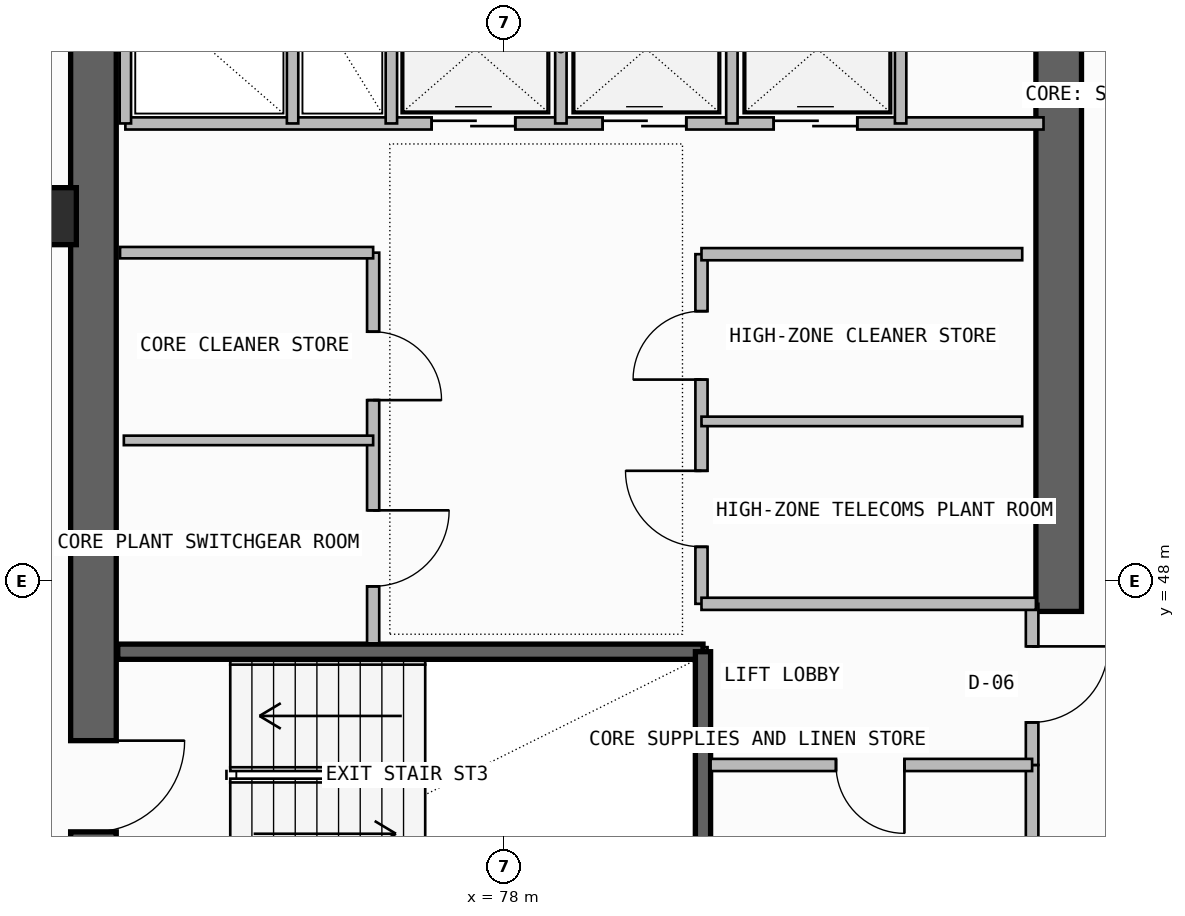
"""IFC4 building model, lengths in metres.
Left out: names, types, materials, properties, quantities, classifications, styles, units other than length and angle.
Written with IfcOpenShell. Run it as: python <this file> out.ifc"""

import sys

from ifc_helpers import new_model, si_unit, direction, frame, frame_2d, origin, origin_2d, place, context, subcontext, project, spatial, rectangle, extrude, element, fill, save


model = new_model("IFC4")
c1 = context("Model", 3, precision=1e-05, world=origin(), true_north=direction((0.0, 1.0)))
c2 = subcontext(c1, "Body", "Model", "MODEL_VIEW")
j1 = project(units=[si_unit("LENGTHUNIT", "METRE"), si_unit("PLANEANGLEUNIT", "RADIAN")], contexts=[c1])
p1 = place(None, origin())
s1 = spatial("IfcSite", under=j1, at=p1, CompositionType="ELEMENT")
p2 = place(p1, origin())
s2 = spatial("IfcBuilding", under=s1, at=p2, CompositionType="ELEMENT")
p3 = place(p2, frame((0.0, 0.0, 264.26)))
s3 = spatial("IfcBuildingStorey", under=s2, at=p3, CompositionType="ELEMENT", Elevation=264.26)
p4 = place(p3, frame((72.6, 43.35, -0.26), z_axis=(0.0, 0.0, 1.0), x_axis=(0.0, 1.0, 0.0)))
e1 = element("IfcWall", 1, at=p4, inside=s3, PredefinedType="SHEAR", context=c2, shape_type="SweptSolid", body=[
    extrude(rectangle(XDim=12.7, YDim=0.6, at=frame_2d((6.35, 0.0))), origin(), (0.0, 0.0, 1.0), 3.52),
])
p5 = place(p4, frame((1.35, 0.0, 0.26)))
e2 = element("IfcOpeningElement", 2, at=p5, cuts=e1, PredefinedType="OPENING", context=c2, shape_type="SweptSolid", body=[
    extrude(rectangle(XDim=1.2, YDim=2.2, at=frame_2d((0.6, 1.1))), frame((0.0, 0.31, 0.0), z_axis=(0.0, -1.0, 0.0), x_axis=(1.0, 0.0, 0.0)), (0.0, 0.0, 1.0), 0.62),
])
p6 = place(p3, frame((85.3, 47.6, -0.26), z_axis=(0.0, 0.0, 1.0), x_axis=(0.0, 1.0, 0.0)))
e3 = element("IfcWall", 3, at=p6, inside=s3, PredefinedType="SHEAR", context=c2, shape_type="SweptSolid", body=[
    extrude(rectangle(XDim=8.45, YDim=0.6, at=frame_2d((4.225, 0.0))), origin(), (0.0, 0.0, 1.0), 3.52),
])
p7 = place(p3, frame((72.0, 52.8, 0.0), z_axis=(0.0, 0.0, 1.0), x_axis=(1.0, 0.0, 0.0)))
e4 = element("IfcColumn", 4, at=p7, inside=s3, PredefinedType="COLUMN", context=c2, shape_type="SweptSolid", body=[
    extrude(rectangle(XDim=0.75, YDim=0.75, at=origin_2d()), origin(), (0.0, 0.0, 1.0), 3.52),
])
p8 = place(p3, frame((72.92, 47.07, -0.26), z_axis=(0.0, 0.0, 1.0), x_axis=(1.0, 0.0, 0.0)))
e5 = element("IfcWall", 5, at=p8, inside=s3, PredefinedType="SOLIDWALL", context=c2, shape_type="SweptSolid", body=[
    extrude(rectangle(XDim=7.7, YDim=0.2, at=frame_2d((3.85, 0.0))), origin(), (0.0, 0.0, 1.0), 3.52),
])
p9 = place(p3, frame((80.62, 43.83, -0.26), z_axis=(0.0, 0.0, 1.0), x_axis=(0.0, 1.0, 0.0)))
e6 = element("IfcWall", 6, at=p9, inside=s3, PredefinedType="SOLIDWALL", context=c2, shape_type="SweptSolid", body=[
    extrude(rectangle(XDim=3.24, YDim=0.2, at=frame_2d((1.62, 0.0))), origin(), (0.0, 0.0, 1.0), 3.52),
])
p10 = place(p3, frame((84.95, 43.68, 0.0), z_axis=(0.0, 0.0, 1.0), x_axis=(0.0, 1.0, 0.0)))
e7 = element("IfcWall", 7, at=p10, inside=s3, PredefinedType="PLUMBINGWALL", context=c2, shape_type="SweptSolid", body=[
    extrude(rectangle(XDim=1.9, YDim=0.165, at=frame_2d((0.95, 0.0))), origin(), (0.0, 0.0, 1.0), 3.26),
])
p11 = place(p3, frame((84.95, 45.58, 0.0), z_axis=(0.0, 0.0, 1.0), x_axis=(0.0, 1.0, 0.0)))
e8 = element("IfcWall", 8, at=p11, inside=s3, PredefinedType="PARTITIONING", context=c2, shape_type="SweptSolid", body=[
    extrude(rectangle(XDim=2.12, YDim=0.165, at=frame_2d((1.06, 0.0))), origin(), (0.0, 0.0, 1.0), 3.26),
])
p12 = place(p11, frame((0.56, 0.0, 0.0)))
e9 = element("IfcOpeningElement", 9, at=p12, cuts=e8, PredefinedType="OPENING", context=c2, shape_type="SweptSolid", body=[
    extrude(rectangle(XDim=1.0, YDim=2.2, at=frame_2d((0.5, 1.1))), frame((0.0, 0.093, 0.0), z_axis=(0.0, -1.0, 0.0), x_axis=(1.0, 0.0, 0.0)), (0.0, 0.0, 1.0), 0.185),
])
p13 = place(p3, frame((80.72, 45.58, 0.0), z_axis=(0.0, 0.0, 1.0), x_axis=(1.0, 0.0, 0.0)))
e10 = element("IfcWall", 10, at=p13, inside=s3, PredefinedType="PLUMBINGWALL", context=c2, shape_type="SweptSolid", body=[
    extrude(rectangle(XDim=4.23, YDim=0.16, at=frame_2d((2.115, 0.0))), origin(), (0.0, 0.0, 1.0), 3.26),
])
p14 = place(p13, frame((1.65, 0.0, 0.0)))
e11 = element("IfcOpeningElement", 11, at=p14, cuts=e10, PredefinedType="OPENING", context=c2, shape_type="SweptSolid", body=[
    extrude(rectangle(XDim=0.9, YDim=2.1, at=frame_2d((0.45, 1.05))), frame((0.0, 0.09, 0.0), z_axis=(0.0, -1.0, 0.0), x_axis=(1.0, 0.0, 0.0)), (0.0, 0.0, 1.0), 0.18),
])
p15 = place(p3, frame((76.28, 47.18, 0.0), z_axis=(0.0, 0.0, 1.0), x_axis=(0.0, 1.0, 0.0)))
e12 = element("IfcWall", 12, at=p15, inside=s3, PredefinedType="SOLIDWALL", context=c2, shape_type="SweptSolid", body=[
    extrude(rectangle(XDim=5.14, YDim=0.16, at=frame_2d((2.57, 0.0))), origin(), (0.0, 0.0, 1.0), 3.26),
])
p16 = place(p15, frame((0.75, 0.0, 0.0)))
e13 = element("IfcOpeningElement", 13, at=p16, cuts=e12, PredefinedType="OPENING", context=c2, shape_type="SweptSolid", body=[
    extrude(rectangle(XDim=1.0, YDim=2.2, at=frame_2d((0.5, 1.1))), frame((0.0, 0.09, 0.0), z_axis=(0.0, -1.0, 0.0), x_axis=(1.0, 0.0, 0.0)), (0.0, 0.0, 1.0), 0.18),
])
p17 = place(p15, frame((3.2, 0.0, 0.0)))
e14 = element("IfcOpeningElement", 14, at=p17, cuts=e12, PredefinedType="OPENING", context=c2, shape_type="SweptSolid", body=[
    extrude(rectangle(XDim=0.9, YDim=2.1, at=frame_2d((0.45, 1.05))), frame((0.0, 0.09, 0.0), z_axis=(0.0, -1.0, 0.0), x_axis=(1.0, 0.0, 0.0)), (0.0, 0.0, 1.0), 0.18),
])
p18 = place(p3, frame((72.95, 52.32, 0.0), z_axis=(0.0, 0.0, 1.0), x_axis=(1.0, 0.0, 0.0)))
e15 = element("IfcWall", 15, at=p18, inside=s3, PredefinedType="SOLIDWALL", context=c2, shape_type="SweptSolid", body=[
    extrude(rectangle(XDim=3.33, YDim=0.15, at=frame_2d((1.665, 0.0))), origin(), (0.0, 0.0, 1.0), 3.26),
])
p19 = place(p3, frame((73.0, 49.85, 0.0), z_axis=(0.0, 0.0, 1.0), x_axis=(1.0, 0.0, 0.0)))
e16 = element("IfcWall", 16, at=p19, inside=s3, PredefinedType="PARTITIONING", context=c2, shape_type="SweptSolid", body=[
    extrude(rectangle(XDim=3.28, YDim=0.125, at=frame_2d((1.64, 0.0))), origin(), (0.0, 0.0, 1.0), 3.26),
])
p20 = place(p3, frame((80.6, 47.7, 0.0), z_axis=(0.0, 0.0, 1.0), x_axis=(0.0, 1.0, 0.0)))
e17 = element("IfcWall", 17, at=p20, inside=s3, PredefinedType="SOLIDWALL", context=c2, shape_type="SweptSolid", body=[
    extrude(rectangle(XDim=4.6, YDim=0.16, at=frame_2d((2.3, 0.0))), origin(), (0.0, 0.0, 1.0), 3.26),
])
p21 = place(p20, frame((0.75, 0.0, 0.0)))
e18 = element("IfcOpeningElement", 18, at=p21, cuts=e17, PredefinedType="OPENING", context=c2, shape_type="SweptSolid", body=[
    extrude(rectangle(XDim=1.0, YDim=2.2, at=frame_2d((0.5, 1.1))), frame((0.0, 0.09, 0.0), z_axis=(0.0, -1.0, 0.0), x_axis=(1.0, 0.0, 0.0)), (0.0, 0.0, 1.0), 0.18),
])
p22 = place(p20, frame((2.95, 0.0, 0.0)))
e19 = element("IfcOpeningElement", 19, at=p22, cuts=e17, PredefinedType="OPENING", context=c2, shape_type="SweptSolid", body=[
    extrude(rectangle(XDim=0.9, YDim=2.1, at=frame_2d((0.45, 1.05))), frame((0.0, 0.09, 0.0), z_axis=(0.0, -1.0, 0.0), x_axis=(1.0, 0.0, 0.0)), (0.0, 0.0, 1.0), 0.18),
])
p23 = place(p3, frame((80.6, 47.7, 0.0), z_axis=(0.0, 0.0, 1.0), x_axis=(1.0, 0.0, 0.0)))
e20 = element("IfcWall", 20, at=p23, inside=s3, PredefinedType="SOLIDWALL", context=c2, shape_type="SweptSolid", body=[
    extrude(rectangle(XDim=4.4, YDim=0.16, at=frame_2d((2.2, 0.0))), origin(), (0.0, 0.0, 1.0), 3.26),
])
p24 = place(p3, frame((80.6, 52.3, 0.0), z_axis=(0.0, 0.0, 1.0), x_axis=(1.0, 0.0, 0.0)))
e21 = element("IfcWall", 21, at=p24, inside=s3, PredefinedType="SOLIDWALL", context=c2, shape_type="SweptSolid", body=[
    extrude(rectangle(XDim=4.22, YDim=0.16, at=frame_2d((2.11, 0.0))), origin(), (0.0, 0.0, 1.0), 3.26),
])
p25 = place(p3, frame((80.6, 50.1, 0.0), z_axis=(0.0, 0.0, 1.0), x_axis=(1.0, 0.0, 0.0)))
e22 = element("IfcWall", 22, at=p25, inside=s3, PredefinedType="PARTITIONING", context=c2, shape_type="SweptSolid", body=[
    extrude(rectangle(XDim=4.22, YDim=0.125, at=frame_2d((2.11, 0.0))), origin(), (0.0, 0.0, 1.0), 3.26),
])
p26 = place(p3, frame((73.02, 54.02, 0.0), z_axis=(0.0, 0.0, 1.0), x_axis=(1.0, 0.0, 0.0)))
e23 = element("IfcWall", 23, at=p26, inside=s3, PredefinedType="SOLIDWALL", context=c2, shape_type="SweptSolid", body=[
    extrude(rectangle(XDim=12.08, YDim=0.16, at=frame_2d((6.04, 0.0))), origin(), (0.0, 0.0, 1.0), 3.26),
])
p27 = place(p26, frame((4.03, 0.0, 0.0)))
e24 = element("IfcOpeningElement", 24, at=p27, cuts=e23, PredefinedType="OPENING", context=c2, shape_type="SweptSolid", body=[
    extrude(rectangle(XDim=1.1, YDim=2.25, at=frame_2d((0.55, 1.125))), frame((0.0, 0.09, 0.0), z_axis=(0.0, -1.0, 0.0), x_axis=(1.0, 0.0, 0.0)), (0.0, 0.0, 1.0), 0.18),
])
p28 = place(p26, frame((6.28, 0.0, 0.0)))
e25 = element("IfcOpeningElement", 25, at=p28, cuts=e23, PredefinedType="OPENING", context=c2, shape_type="SweptSolid", body=[
    extrude(rectangle(XDim=1.1, YDim=2.25, at=frame_2d((0.55, 1.125))), frame((0.0, 0.09, 0.0), z_axis=(0.0, -1.0, 0.0), x_axis=(1.0, 0.0, 0.0)), (0.0, 0.0, 1.0), 0.18),
])
p29 = place(p26, frame((8.53, 0.0, 0.0)))
e26 = element("IfcOpeningElement", 26, at=p29, cuts=e23, PredefinedType="OPENING", context=c2, shape_type="SweptSolid", body=[
    extrude(rectangle(XDim=1.1, YDim=2.25, at=frame_2d((0.55, 1.125))), frame((0.0, 0.09, 0.0), z_axis=(0.0, -1.0, 0.0), x_axis=(1.0, 0.0, 0.0)), (0.0, 0.0, 1.0), 0.18),
])
p30 = place(p3, frame((73.02, 54.02, 0.0), z_axis=(0.0, 0.0, 1.0), x_axis=(0.0, 1.0, 0.0)))
e27 = element("IfcWall", 27, at=p30, inside=s3, PredefinedType="PLUMBINGWALL", context=c2, shape_type="SweptSolid", body=[
    extrude(rectangle(XDim=1.94, YDim=0.15, at=frame_2d((0.97, 0.0))), origin(), (0.0, 0.0, 1.0), 3.26),
])
p31 = place(p3, frame((76.52, 54.02, 0.0), z_axis=(0.0, 0.0, 1.0), x_axis=(0.0, 1.0, 0.0)))
e28 = element("IfcWall", 28, at=p31, inside=s3, PredefinedType="SOLIDWALL", context=c2, shape_type="SweptSolid", body=[
    extrude(rectangle(XDim=1.94, YDim=0.15, at=frame_2d((0.97, 0.0))), origin(), (0.0, 0.0, 1.0), 3.26),
])
p32 = place(p3, frame((75.22, 54.02, 0.0), z_axis=(0.0, 0.0, 1.0), x_axis=(0.0, 1.0, 0.0)))
e29 = element("IfcWall", 29, at=p32, inside=s3, PredefinedType="PLUMBINGWALL", context=c2, shape_type="SweptSolid", body=[
    extrude(rectangle(XDim=1.94, YDim=0.15, at=frame_2d((0.97, 0.0))), origin(), (0.0, 0.0, 1.0), 3.26),
])
for number, where, z_axis, x_axis in (
    (30, (78.75, 54.02, 0.0), (0.0, 0.0, 1.0), (0.0, 1.0, 0.0)),
    (31, (81.0, 54.02, 0.0), (0.0, 0.0, 1.0), (0.0, 1.0, 0.0)),
):
    element("IfcWall", number, at=place(p3, frame(where, z_axis=z_axis, x_axis=x_axis)), inside=s3, PredefinedType="PLUMBINGWALL", context=c2, shape_type="SweptSolid", body=[
        extrude(rectangle(XDim=1.96, YDim=0.15, at=frame_2d((0.98, 0.0))), origin(), (0.0, 0.0, 1.0), 3.26),
    ])
p33 = place(p3, frame((83.22, 54.02, 0.0), z_axis=(0.0, 0.0, 1.0), x_axis=(0.0, 1.0, 0.0)))
e32 = element("IfcWall", 32, at=p33, inside=s3, PredefinedType="SOLIDWALL", context=c2, shape_type="SweptSolid", body=[
    extrude(rectangle(XDim=1.96, YDim=0.15, at=frame_2d((0.98, 0.0))), origin(), (0.0, 0.0, 1.0), 3.26),
])
p34 = place(p5, frame((1.2, 0.0, 0.0), z_axis=(0.0, 0.0, 1.0), x_axis=(-1.0, 0.0, 0.0)))
e33 = element("IfcDoor", 33, at=p34, inside=s3, OperationType="SINGLE_SWING_LEFT", PredefinedType="USERDEFINED", context=c2, shape_type="SweptSolid", body=[
    extrude(rectangle(XDim=1.2, YDim=2.2, at=frame_2d((0.6, 1.1))), frame((0.0, 0.025, 0.0), z_axis=(0.0, -1.0, 0.0), x_axis=(1.0, 0.0, 0.0)), (0.0, 0.0, 1.0), 0.05),
])
fill(e2, e33)
p35 = place(p12, frame((1.0, 0.0, 0.0), z_axis=(0.0, 0.0, 1.0), x_axis=(-1.0, 0.0, 0.0)))
e34 = element("IfcDoor", 34, at=p35, inside=s3, OperationType="SINGLE_SWING_LEFT", PredefinedType="DOOR", context=c2, shape_type="SweptSolid", body=[
    extrude(rectangle(XDim=1.0, YDim=2.2, at=frame_2d((0.5, 1.1))), frame((0.0, 0.025, 0.0), z_axis=(0.0, -1.0, 0.0), x_axis=(1.0, 0.0, 0.0)), (0.0, 0.0, 1.0), 0.05),
])
fill(e9, e34)
p36 = place(p14, frame((0.9, 0.0, 0.0), z_axis=(0.0, 0.0, 1.0), x_axis=(-1.0, 0.0, 0.0)))
e35 = element("IfcDoor", 35, at=p36, inside=s3, OperationType="SINGLE_SWING_LEFT", PredefinedType="DOOR", context=c2, shape_type="SweptSolid", body=[
    extrude(rectangle(XDim=0.9, YDim=2.1, at=frame_2d((0.45, 1.05))), frame((0.0, 0.025, 0.0), z_axis=(0.0, -1.0, 0.0), x_axis=(1.0, 0.0, 0.0)), (0.0, 0.0, 1.0), 0.05),
])
fill(e11, e35)
p37 = place(p16, frame((1.0, 0.0, 0.0), z_axis=(0.0, 0.0, 1.0), x_axis=(-1.0, 0.0, 0.0)))
e36 = element("IfcDoor", 36, at=p37, inside=s3, OperationType="SINGLE_SWING_LEFT", PredefinedType="DOOR", context=c2, shape_type="SweptSolid", body=[
    extrude(rectangle(XDim=1.0, YDim=2.2, at=frame_2d((0.5, 1.1))), frame((0.0, 0.025, 0.0), z_axis=(0.0, -1.0, 0.0), x_axis=(1.0, 0.0, 0.0)), (0.0, 0.0, 1.0), 0.05),
])
fill(e13, e36)
p38 = place(p17, frame((0.9, 0.0, 0.0), z_axis=(0.0, 0.0, 1.0), x_axis=(-1.0, 0.0, 0.0)))
e37 = element("IfcDoor", 37, at=p38, inside=s3, OperationType="SINGLE_SWING_RIGHT", PredefinedType="DOOR", context=c2, shape_type="SweptSolid", body=[
    extrude(rectangle(XDim=0.9, YDim=2.1, at=frame_2d((0.45, 1.05))), frame((0.0, 0.025, 0.0), z_axis=(0.0, -1.0, 0.0), x_axis=(1.0, 0.0, 0.0)), (0.0, 0.0, 1.0), 0.05),
])
fill(e14, e37)
p39 = place(p21, origin())
e38 = element("IfcDoor", 38, at=p39, inside=s3, OperationType="SINGLE_SWING_RIGHT", PredefinedType="DOOR", context=c2, shape_type="SweptSolid", body=[
    extrude(rectangle(XDim=1.0, YDim=2.2, at=frame_2d((0.5, 1.1))), frame((0.0, 0.025, 0.0), z_axis=(0.0, -1.0, 0.0), x_axis=(1.0, 0.0, 0.0)), (0.0, 0.0, 1.0), 0.05),
])
fill(e18, e38)
p40 = place(p22, origin())
e39 = element("IfcDoor", 39, at=p40, inside=s3, OperationType="SINGLE_SWING_LEFT", PredefinedType="DOOR", context=c2, shape_type="SweptSolid", body=[
    extrude(rectangle(XDim=0.9, YDim=2.1, at=frame_2d((0.45, 1.05))), frame((0.0, 0.025, 0.0), z_axis=(0.0, -1.0, 0.0), x_axis=(1.0, 0.0, 0.0)), (0.0, 0.0, 1.0), 0.05),
])
fill(e19, e39)
p41 = place(p27, origin())
e40 = element("IfcDoor", 40, at=p41, inside=s3, OperationType="DOUBLE_DOOR_SLIDING", PredefinedType="DOOR", context=c2, shape_type="SweptSolid", body=[
    extrude(rectangle(XDim=1.1, YDim=2.25, at=frame_2d((0.55, 1.125))), frame((0.0, 0.025, 0.0), z_axis=(0.0, -1.0, 0.0), x_axis=(1.0, 0.0, 0.0)), (0.0, 0.0, 1.0), 0.05),
])
fill(e24, e40)
p42 = place(p28, origin())
e41 = element("IfcDoor", 41, at=p42, inside=s3, OperationType="DOUBLE_DOOR_SLIDING", PredefinedType="DOOR", context=c2, shape_type="SweptSolid", body=[
    extrude(rectangle(XDim=1.1, YDim=2.25, at=frame_2d((0.55, 1.125))), frame((0.0, 0.025, 0.0), z_axis=(0.0, -1.0, 0.0), x_axis=(1.0, 0.0, 0.0)), (0.0, 0.0, 1.0), 0.05),
])
fill(e25, e41)
p43 = place(p29, origin())
e42 = element("IfcDoor", 42, at=p43, inside=s3, OperationType="DOUBLE_DOOR_SLIDING", PredefinedType="DOOR", context=c2, shape_type="SweptSolid", body=[
    extrude(rectangle(XDim=1.1, YDim=2.25, at=frame_2d((0.55, 1.125))), frame((0.0, 0.025, 0.0), z_axis=(0.0, -1.0, 0.0), x_axis=(1.0, 0.0, 0.0)), (0.0, 0.0, 1.0), 0.05),
])
fill(e26, e42)
save(model, sys.argv[1])
